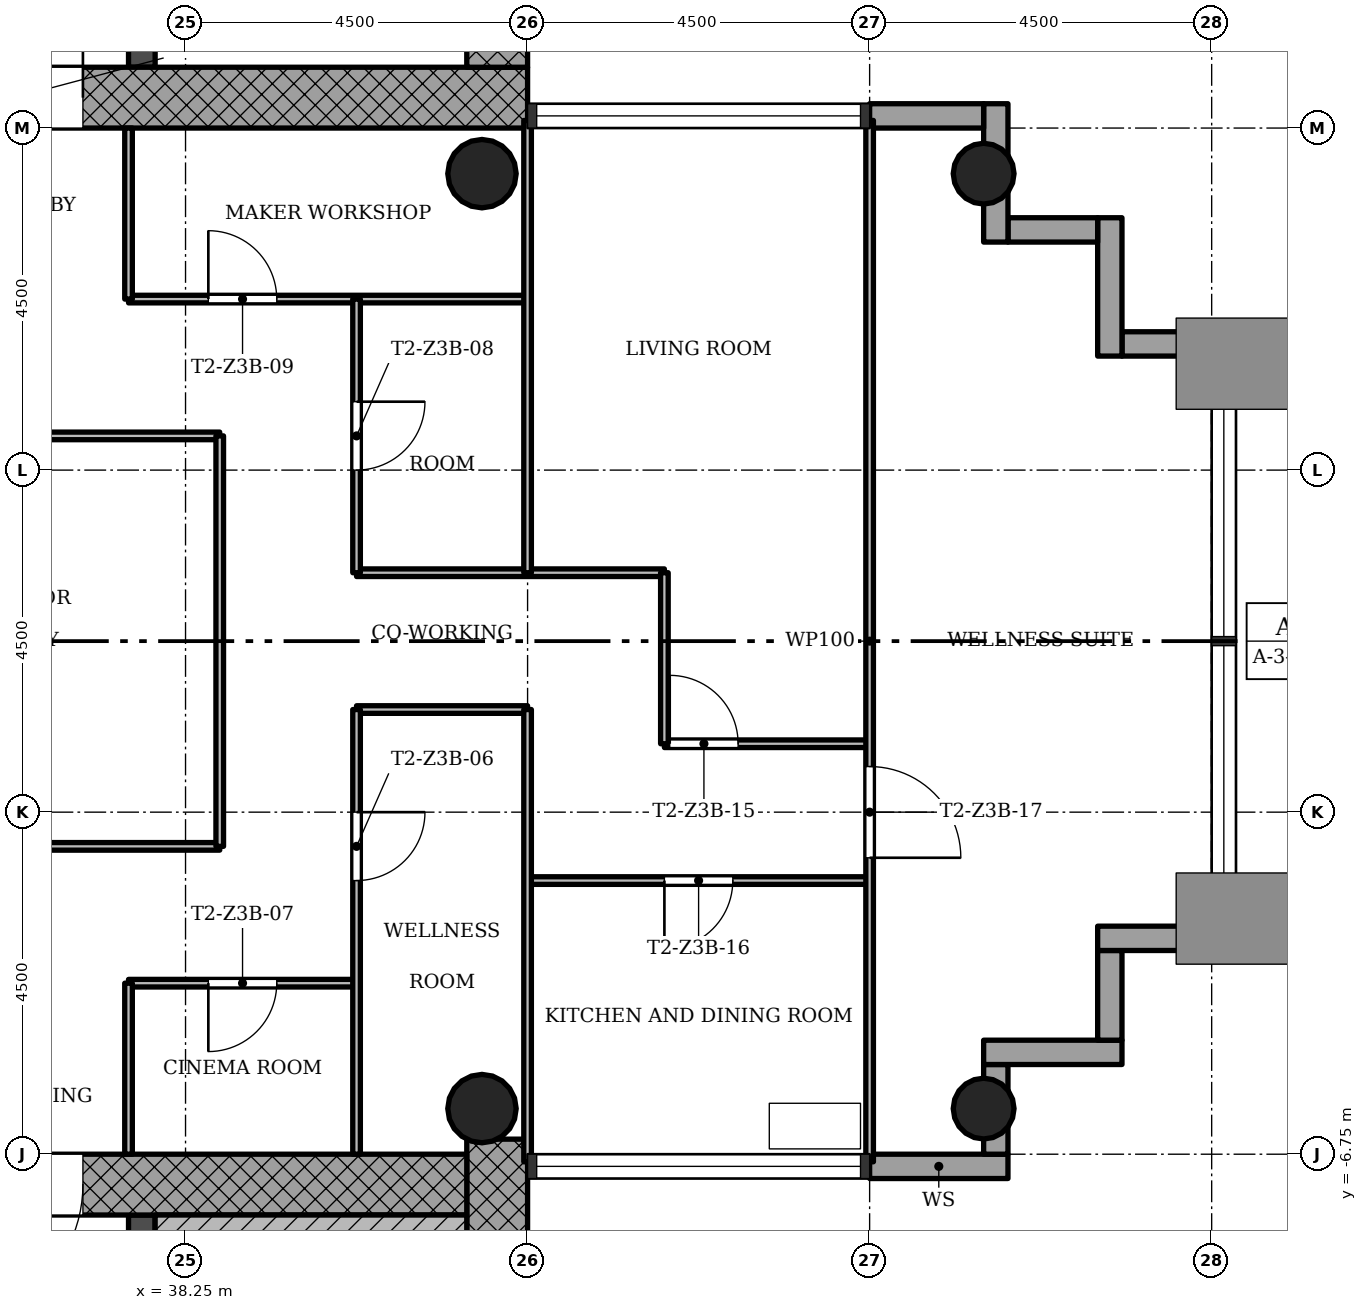
"""IFC4 building model, lengths in metres.
Left out: names, types, materials, properties, quantities, classifications, styles, units other than length and angle.
Written with IfcOpenShell. Run it as: python <this file> out.ifc"""

import sys

from ifc_helpers import new_model, si_unit, direction, frame, frame_2d, origin, origin_2d, place, context, subcontext, project, spatial, rectangle, hollow_circle, extrude, element, fill, save


model = new_model("IFC4")
c1 = context("Model", 3, precision=1e-05, world=origin(), true_north=direction((0.0, 1.0)))
c2 = subcontext(c1, "Body", "Model", "MODEL_VIEW")
j1 = project(units=[si_unit("LENGTHUNIT", "METRE"), si_unit("PLANEANGLEUNIT", "RADIAN")], contexts=[c1])
p1 = place(None, origin())
s1 = spatial("IfcSite", under=j1, at=p1, CompositionType="ELEMENT")
p2 = place(p1, origin())
s2 = spatial("IfcBuilding", under=s1, at=p2, CompositionType="ELEMENT")
p3 = place(p2, frame((0.0, 0.0, 150.7)))
s3 = spatial("IfcBuildingStorey", under=s2, at=p3, CompositionType="ELEMENT", Elevation=150.7)
p4 = place(p3, frame((30.05, 7.15, 0.0), z_axis=(0.0, 0.0, 1.0), x_axis=(1.0, 0.0, 0.0)))
e1 = element("IfcWall", 1, at=p4, inside=s3, PredefinedType="SHEAR", context=c2, shape_type="SweptSolid", body=[
    extrude(rectangle(XDim=12.7, YDim=0.8, at=frame_2d((6.35, 0.0))), origin(), (0.0, 0.0, 1.0), 3.4),
])
p5 = place(p4, frame((5.05, 0.0, 0.0)))
e2 = element("IfcOpeningElement", 2, at=p5, cuts=e1, PredefinedType="OPENING", context=c2, shape_type="SweptSolid", body=[
    extrude(rectangle(XDim=1.8, YDim=2.1, at=frame_2d((0.9, 1.05))), frame((0.0, 0.41, 0.0), z_axis=(0.0, -1.0, 0.0), x_axis=(1.0, 0.0, 0.0)), (0.0, 0.0, 1.0), 0.82),
])
p6 = place(p3, frame((42.35, 7.55, 0.0), z_axis=(0.0, 0.0, 1.0), x_axis=(0.0, 1.0, 0.0)))
e3 = element("IfcWall", 3, at=p6, inside=s3, PredefinedType="SHEAR", context=c2, shape_type="SweptSolid", body=[
    extrude(rectangle(XDim=8.2, YDim=0.8, at=frame_2d((4.1, 0.0))), origin(), (0.0, 0.0, 1.0), 3.4),
])
p7 = place(p3, frame((37.675, 7.55, 0.0), z_axis=(0.0, 0.0, 1.0), x_axis=(0.0, 1.0, 0.0)))
e4 = element("IfcWall", 4, at=p7, inside=s3, PredefinedType="SHEAR", context=c2, shape_type="SweptSolid", body=[
    extrude(rectangle(XDim=7.4, YDim=0.35, at=frame_2d((3.7, 0.0))), origin(), (0.0, 0.0, 1.0), 3.4),
])
p8 = place(p7, frame((0.95, 0.0, 0.0)))
e5 = element("IfcOpeningElement", 5, at=p8, cuts=e4, PredefinedType="OPENING", context=c2, shape_type="SweptSolid", body=[
    extrude(rectangle(XDim=1.1, YDim=2.1, at=frame_2d((0.55, 1.05))), frame((0.0, 0.185, 0.0), z_axis=(0.0, -1.0, 0.0), x_axis=(1.0, 0.0, 0.0)), (0.0, 0.0, 1.0), 0.37),
])
p9 = place(p7, frame((3.15, 0.0, 0.0)))
e6 = element("IfcOpeningElement", 6, at=p9, cuts=e4, PredefinedType="OPENING", context=c2, shape_type="SweptSolid", body=[
    extrude(rectangle(XDim=1.1, YDim=2.1, at=frame_2d((0.55, 1.05))), frame((0.0, 0.185, 0.0), z_axis=(0.0, -1.0, 0.0), x_axis=(1.0, 0.0, 0.0)), (0.0, 0.0, 1.0), 0.37),
])
p10 = place(p7, frame((5.35, 0.0, 0.0)))
e7 = element("IfcOpeningElement", 7, at=p10, cuts=e4, PredefinedType="OPENING", context=c2, shape_type="SweptSolid", body=[
    extrude(rectangle(XDim=1.1, YDim=2.1, at=frame_2d((0.55, 1.05))), frame((0.0, 0.185, 0.0), z_axis=(0.0, -1.0, 0.0), x_axis=(1.0, 0.0, 0.0)), (0.0, 0.0, 1.0), 0.37),
])
p11 = place(p3, frame((42.35, -14.95, 0.0), z_axis=(0.0, 0.0, 1.0), x_axis=(0.0, 1.0, 0.0)))
e8 = element("IfcWall", 8, at=p11, inside=s3, PredefinedType="SHEAR", context=c2, shape_type="SweptSolid", body=[
    extrude(rectangle(XDim=8.398, YDim=0.8, at=frame_2d((4.199, 0.0))), origin(), (0.0, 0.0, 1.0), 3.4),
])
p12 = place(p3, frame((41.95, -7.15, 0.0), z_axis=(0.0, 0.0, 1.0), x_axis=(-1.0, 0.0, 0.0)))
e9 = element("IfcWall", 9, at=p12, inside=s3, PredefinedType="SHEAR", context=c2, shape_type="SweptSolid", body=[
    extrude(rectangle(XDim=12.7, YDim=0.8, at=frame_2d((6.35, 0.0))), origin(), (0.0, 0.0, 1.0), 3.4),
])
p13 = place(p12, frame((5.05, 0.0, 0.0)))
e10 = element("IfcOpeningElement", 10, at=p13, cuts=e9, PredefinedType="OPENING", context=c2, shape_type="SweptSolid", body=[
    extrude(rectangle(XDim=1.8, YDim=2.1, at=frame_2d((0.9, 1.05))), frame((0.0, 0.41, 0.0), z_axis=(0.0, -1.0, 0.0), x_axis=(1.0, 0.0, 0.0)), (0.0, 0.0, 1.0), 0.82),
])
p14 = place(p3, frame((37.675, -14.95, 0.0), z_axis=(0.0, 0.0, 1.0), x_axis=(0.0, 1.0, 0.0)))
e11 = element("IfcWall", 11, at=p14, inside=s3, PredefinedType="SHEAR", context=c2, shape_type="SweptSolid", body=[
    extrude(rectangle(XDim=7.4, YDim=0.35, at=frame_2d((3.7, 0.0))), origin(), (0.0, 0.0, 1.0), 3.4),
])
p15 = place(p14, frame((5.65, 0.0, 0.0)))
e12 = element("IfcOpeningElement", 12, at=p15, cuts=e11, PredefinedType="OPENING", context=c2, shape_type="SweptSolid", body=[
    extrude(rectangle(XDim=0.9, YDim=2.1, at=frame_2d((0.45, 1.05))), frame((0.0, 0.185, 0.0), z_axis=(0.0, -1.0, 0.0), x_axis=(1.0, 0.0, 0.0)), (0.0, 0.0, 1.0), 0.37),
])
for number, where, z_axis, x_axis in (
    (13, (48.75, -6.15, 0.0), (0.0, 0.0, 1.0), (1.0, 0.0, 0.0)),
    (14, (48.75, 6.15, 0.0), (0.0, 0.0, 1.0), (1.0, 0.0, 0.0)),
):
    element("IfcColumn", number, at=place(p3, frame(where, z_axis=z_axis, x_axis=x_axis)), inside=s3, PredefinedType="COLUMN", context=c2, shape_type="SweptSolid", body=[
        extrude(hollow_circle(Radius=0.4, WallThickness=0.028, at=origin_2d()), origin(), (0.0, 0.0, 1.0), 3.4),
    ])
for number, where, z_axis, x_axis in (
    (15, (42.15, -6.15, 0.0), (0.0, 0.0, 1.0), (1.0, 0.0, 0.0)),
    (16, (42.15, 6.15, 0.0), (0.0, 0.0, 1.0), (1.0, 0.0, 0.0)),
):
    element("IfcColumn", number, at=place(p3, frame(where, z_axis=z_axis, x_axis=x_axis)), inside=s3, PredefinedType="COLUMN", context=c2, shape_type="SweptSolid", body=[
        extrude(hollow_circle(Radius=0.45, WallThickness=0.032, at=origin_2d()), origin(), (0.0, 0.0, 1.0), 3.4),
    ])
p16 = place(p3, frame((47.25, -6.91, -0.3), z_axis=(0.0, 0.0, 1.0), x_axis=(1.0, 0.0, 0.0)))
e17 = element("IfcWall", 17, at=p16, inside=s3, PredefinedType="STANDARD", context=c2, shape_type="SweptSolid", body=[
    extrude(rectangle(XDim=1.82, YDim=0.32, at=frame_2d((0.91, 0.0))), origin(), (0.0, 0.0, 1.0), 3.4),
])
p17 = place(p3, frame((48.91, -6.75, -0.3), z_axis=(0.0, 0.0, 1.0), x_axis=(0.0, 1.0, 0.0)))
e18 = element("IfcWall", 18, at=p17, inside=s3, PredefinedType="STANDARD", context=c2, shape_type="SweptSolid", body=[
    extrude(rectangle(XDim=1.18, YDim=0.32, at=frame_2d((0.59, 0.0))), origin(), (0.0, 0.0, 1.0), 3.4),
])
p18 = place(p3, frame((48.75, -5.41, -0.3), z_axis=(0.0, 0.0, 1.0), x_axis=(1.0, 0.0, 0.0)))
e19 = element("IfcWall", 19, at=p18, inside=s3, PredefinedType="STANDARD", context=c2, shape_type="SweptSolid", body=[
    extrude(rectangle(XDim=1.82, YDim=0.32, at=frame_2d((0.91, 0.0))), origin(), (0.0, 0.0, 1.0), 3.4),
])
p19 = place(p3, frame((50.41, -5.25, -0.3), z_axis=(0.0, 0.0, 1.0), x_axis=(0.0, 1.0, 0.0)))
e20 = element("IfcWall", 20, at=p19, inside=s3, PredefinedType="STANDARD", context=c2, shape_type="SweptSolid", body=[
    extrude(rectangle(XDim=1.18, YDim=0.32, at=frame_2d((0.59, 0.0))), origin(), (0.0, 0.0, 1.0), 3.4),
])
p20 = place(p3, frame((50.25, -3.91, -0.3), z_axis=(0.0, 0.0, 1.0), x_axis=(1.0, 0.0, 0.0)))
e21 = element("IfcWall", 21, at=p20, inside=s3, PredefinedType="STANDARD", context=c2, shape_type="SweptSolid", body=[
    extrude(rectangle(XDim=1.82, YDim=0.32, at=frame_2d((0.91, 0.0))), origin(), (0.0, 0.0, 1.0), 3.4),
])
p21 = place(p3, frame((52.07, 3.91, -0.3), z_axis=(0.0, 0.0, 1.0), x_axis=(-1.0, 0.0, 0.0)))
e22 = element("IfcWall", 22, at=p21, inside=s3, PredefinedType="STANDARD", context=c2, shape_type="SweptSolid", body=[
    extrude(rectangle(XDim=1.5, YDim=0.32, at=frame_2d((0.75, 0.0))), origin(), (0.0, 0.0, 1.0), 3.4),
])
p22 = place(p3, frame((50.41, 3.75, -0.3), z_axis=(0.0, 0.0, 1.0), x_axis=(0.0, 1.0, 0.0)))
e23 = element("IfcWall", 23, at=p22, inside=s3, PredefinedType="STANDARD", context=c2, shape_type="SweptSolid", body=[
    extrude(rectangle(XDim=1.82, YDim=0.32, at=frame_2d((0.91, 0.0))), origin(), (0.0, 0.0, 1.0), 3.4),
])
p23 = place(p3, frame((50.25, 5.41, -0.3), z_axis=(0.0, 0.0, 1.0), x_axis=(-1.0, 0.0, 0.0)))
e24 = element("IfcWall", 24, at=p23, inside=s3, PredefinedType="STANDARD", context=c2, shape_type="SweptSolid", body=[
    extrude(rectangle(XDim=1.18, YDim=0.32, at=frame_2d((0.59, 0.0))), origin(), (0.0, 0.0, 1.0), 3.4),
])
p24 = place(p3, frame((48.91, 5.25, -0.3), z_axis=(0.0, 0.0, 1.0), x_axis=(0.0, 1.0, 0.0)))
e25 = element("IfcWall", 25, at=p24, inside=s3, PredefinedType="STANDARD", context=c2, shape_type="SweptSolid", body=[
    extrude(rectangle(XDim=1.82, YDim=0.32, at=frame_2d((0.91, 0.0))), origin(), (0.0, 0.0, 1.0), 3.4),
])
p25 = place(p3, frame((48.75, 6.91, -0.3), z_axis=(0.0, 0.0, 1.0), x_axis=(-1.0, 0.0, 0.0)))
e26 = element("IfcWall", 26, at=p25, inside=s3, PredefinedType="STANDARD", context=c2, shape_type="SweptSolid", body=[
    extrude(rectangle(XDim=1.5, YDim=0.32, at=frame_2d((0.75, 0.0))), origin(), (0.0, 0.0, 1.0), 3.4),
])
p26 = place(p3, frame((40.5, -4.5, 0.0), z_axis=(0.0, 0.0, 1.0), x_axis=(-1.0, 0.0, 0.0)))
e27 = element("IfcWall", 27, at=p26, inside=s3, PredefinedType="PARTITIONING", context=c2, shape_type="SweptSolid", body=[
    extrude(rectangle(XDim=3.0, YDim=0.1, at=frame_2d((1.5, 0.0))), origin(), (0.0, 0.0, 1.0), 3.0),
])
p27 = place(p26, frame((1.05, 0.0, 0.0)))
e28 = element("IfcOpeningElement", 28, at=p27, cuts=e27, PredefinedType="OPENING", context=c2, shape_type="SweptSolid", body=[
    extrude(rectangle(XDim=0.9, YDim=2.1, at=frame_2d((0.45, 1.05))), frame((0.0, 0.06, 0.0), z_axis=(0.0, -1.0, 0.0), x_axis=(1.0, 0.0, 0.0)), (0.0, 0.0, 1.0), 0.12),
])
p28 = place(p3, frame((47.25, -3.15, 0.0), z_axis=(0.0, 0.0, 1.0), x_axis=(-1.0, 0.0, 0.0)))
e29 = element("IfcWall", 29, at=p28, inside=s3, PredefinedType="PARTITIONING", context=c2, shape_type="SweptSolid", body=[
    extrude(rectangle(XDim=4.5, YDim=0.1, at=frame_2d((2.25, 0.0))), origin(), (0.0, 0.0, 1.0), 3.0),
])
p29 = place(p28, frame((1.8, 0.0, 0.0)))
e30 = element("IfcOpeningElement", 30, at=p29, cuts=e29, PredefinedType="OPENING", context=c2, shape_type="SweptSolid", body=[
    extrude(rectangle(XDim=0.9, YDim=2.1, at=frame_2d((0.45, 1.05))), frame((0.0, 0.06, 0.0), z_axis=(0.0, -1.0, 0.0), x_axis=(1.0, 0.0, 0.0)), (0.0, 0.0, 1.0), 0.12),
])
p30 = place(p3, frame((38.7, -2.7, 0.0), z_axis=(0.0, 0.0, 1.0), x_axis=(-1.0, 0.0, 0.0)))
e31 = element("IfcWall", 31, at=p30, inside=s3, PredefinedType="PARTITIONING", context=c2, shape_type="SweptSolid", body=[
    extrude(rectangle(XDim=5.4, YDim=0.1, at=frame_2d((2.7, 0.0))), origin(), (0.0, 0.0, 1.0), 3.0),
])
p31 = place(p3, frame((47.25, -1.35, 0.0), z_axis=(0.0, 0.0, 1.0), x_axis=(-1.0, 0.0, 0.0)))
e32 = element("IfcWall", 32, at=p31, inside=s3, PredefinedType="PARTITIONING", context=c2, shape_type="SweptSolid", body=[
    extrude(rectangle(XDim=2.7, YDim=0.1, at=frame_2d((1.35, 0.0))), origin(), (0.0, 0.0, 1.0), 3.0),
])
p32 = place(p31, frame((1.73, 0.0, 0.0)))
e33 = element("IfcOpeningElement", 33, at=p32, cuts=e32, PredefinedType="OPENING", context=c2, shape_type="SweptSolid", body=[
    extrude(rectangle(XDim=0.9, YDim=2.1, at=frame_2d((0.45, 1.05))), frame((0.0, 0.06, 0.0), z_axis=(0.0, -1.0, 0.0), x_axis=(1.0, 0.0, 0.0)), (0.0, 0.0, 1.0), 0.12),
])
p33 = place(p3, frame((42.75, -0.9, 0.0), z_axis=(0.0, 0.0, 1.0), x_axis=(-1.0, 0.0, 0.0)))
e34 = element("IfcWall", 34, at=p33, inside=s3, PredefinedType="PARTITIONING", context=c2, shape_type="SweptSolid", body=[
    extrude(rectangle(XDim=2.25, YDim=0.1, at=frame_2d((1.125, 0.0))), origin(), (0.0, 0.0, 1.0), 3.0),
])
p34 = place(p3, frame((44.55, 0.9, 0.0), z_axis=(0.0, 0.0, 1.0), x_axis=(-1.0, 0.0, 0.0)))
e35 = element("IfcWall", 35, at=p34, inside=s3, PredefinedType="PARTITIONING", context=c2, shape_type="SweptSolid", body=[
    extrude(rectangle(XDim=4.05, YDim=0.1, at=frame_2d((2.025, 0.0))), origin(), (0.0, 0.0, 1.0), 3.0),
])
p35 = place(p3, frame((38.7, 2.7, 0.0), z_axis=(0.0, 0.0, 1.0), x_axis=(-1.0, 0.0, 0.0)))
e36 = element("IfcWall", 36, at=p35, inside=s3, PredefinedType="PARTITIONING", context=c2, shape_type="SweptSolid", body=[
    extrude(rectangle(XDim=5.4, YDim=0.1, at=frame_2d((2.7, 0.0))), origin(), (0.0, 0.0, 1.0), 3.0),
])
p36 = place(p3, frame((42.75, 4.5, 0.0), z_axis=(0.0, 0.0, 1.0), x_axis=(-1.0, 0.0, 0.0)))
e37 = element("IfcWall", 37, at=p36, inside=s3, PredefinedType="PARTITIONING", context=c2, shape_type="SweptSolid", body=[
    extrude(rectangle(XDim=5.25, YDim=0.1, at=frame_2d((2.625, 0.0))), origin(), (0.0, 0.0, 1.0), 3.0),
])
p37 = place(p36, frame((3.3, 0.0, 0.0)))
e38 = element("IfcOpeningElement", 38, at=p37, cuts=e37, PredefinedType="OPENING", context=c2, shape_type="SweptSolid", body=[
    extrude(rectangle(XDim=0.9, YDim=2.1, at=frame_2d((0.45, 1.05))), frame((0.0, 0.06, 0.0), z_axis=(0.0, -1.0, 0.0), x_axis=(1.0, 0.0, 0.0)), (0.0, 0.0, 1.0), 0.12),
])
p38 = place(p3, frame((47.25, -6.85, 0.0), z_axis=(0.0, 0.0, 1.0), x_axis=(0.0, 1.0, 0.0)))
e39 = element("IfcWall", 39, at=p38, inside=s3, PredefinedType="PARTITIONING", context=c2, shape_type="SweptSolid", body=[
    extrude(rectangle(XDim=13.7, YDim=0.1, at=frame_2d((6.85, 0.0))), origin(), (0.0, 0.0, 1.0), 3.0),
])
p39 = place(p38, frame((4.0, 0.0, 0.0)))
e40 = element("IfcOpeningElement", 40, at=p39, cuts=e39, PredefinedType="OPENING", context=c2, shape_type="SweptSolid", body=[
    extrude(rectangle(XDim=1.2, YDim=2.1, at=frame_2d((0.6, 1.05))), frame((0.0, 0.06, 0.0), z_axis=(0.0, -1.0, 0.0), x_axis=(1.0, 0.0, 0.0)), (0.0, 0.0, 1.0), 0.12),
])
p40 = place(p3, frame((44.55, -1.35, 0.0), z_axis=(0.0, 0.0, 1.0), x_axis=(0.0, 1.0, 0.0)))
e41 = element("IfcWall", 41, at=p40, inside=s3, PredefinedType="PARTITIONING", context=c2, shape_type="SweptSolid", body=[
    extrude(rectangle(XDim=2.25, YDim=0.1, at=frame_2d((1.125, 0.0))), origin(), (0.0, 0.0, 1.0), 3.0),
])
for number, where, z_axis, x_axis in (
    (42, (42.75, -6.85, 0.0), (0.0, 0.0, 1.0), (0.0, 1.0, 0.0)),
    (43, (42.75, 0.9, 0.0), (0.0, 0.0, 1.0), (0.0, 1.0, 0.0)),
):
    element("IfcWall", number, at=place(p3, frame(where, z_axis=z_axis, x_axis=x_axis)), inside=s3, PredefinedType="PARTITIONING", context=c2, shape_type="SweptSolid", body=[
        extrude(rectangle(XDim=5.95, YDim=0.1, at=frame_2d((2.975, 0.0))), origin(), (0.0, 0.0, 1.0), 3.0),
    ])
p41 = place(p3, frame((40.5, -6.75, 0.0), z_axis=(0.0, 0.0, 1.0), x_axis=(0.0, 1.0, 0.0)))
e44 = element("IfcWall", 44, at=p41, inside=s3, PredefinedType="PARTITIONING", context=c2, shape_type="SweptSolid", body=[
    extrude(rectangle(XDim=5.85, YDim=0.1, at=frame_2d((2.925, 0.0))), origin(), (0.0, 0.0, 1.0), 3.0),
])
p42 = place(p41, frame((3.6, 0.0, 0.0)))
e45 = element("IfcOpeningElement", 45, at=p42, cuts=e44, PredefinedType="OPENING", context=c2, shape_type="SweptSolid", body=[
    extrude(rectangle(XDim=0.9, YDim=2.1, at=frame_2d((0.45, 1.05))), frame((0.0, 0.06, 0.0), z_axis=(0.0, -1.0, 0.0), x_axis=(1.0, 0.0, 0.0)), (0.0, 0.0, 1.0), 0.12),
])
p43 = place(p3, frame((40.5, 0.9, 0.0), z_axis=(0.0, 0.0, 1.0), x_axis=(0.0, 1.0, 0.0)))
e46 = element("IfcWall", 46, at=p43, inside=s3, PredefinedType="PARTITIONING", context=c2, shape_type="SweptSolid", body=[
    extrude(rectangle(XDim=3.6, YDim=0.1, at=frame_2d((1.8, 0.0))), origin(), (0.0, 0.0, 1.0), 3.0),
])
p44 = place(p43, frame((1.35, 0.0, 0.0)))
e47 = element("IfcOpeningElement", 47, at=p44, cuts=e46, PredefinedType="OPENING", context=c2, shape_type="SweptSolid", body=[
    extrude(rectangle(XDim=0.9, YDim=2.1, at=frame_2d((0.45, 1.05))), frame((0.0, 0.06, 0.0), z_axis=(0.0, -1.0, 0.0), x_axis=(1.0, 0.0, 0.0)), (0.0, 0.0, 1.0), 0.12),
])
p45 = place(p3, frame((38.7, -2.7, 0.0), z_axis=(0.0, 0.0, 1.0), x_axis=(0.0, 1.0, 0.0)))
e48 = element("IfcWall", 48, at=p45, inside=s3, PredefinedType="PARTITIONING", context=c2, shape_type="SweptSolid", body=[
    extrude(rectangle(XDim=5.4, YDim=0.1, at=frame_2d((2.7, 0.0))), origin(), (0.0, 0.0, 1.0), 3.0),
])
for number, where, z_axis, x_axis in (
    (49, (37.5, -6.75, 0.0), (0.0, 0.0, 1.0), (0.0, 1.0, 0.0)),
    (50, (37.5, 4.5, 0.0), (0.0, 0.0, 1.0), (0.0, 1.0, 0.0)),
):
    element("IfcWall", number, at=place(p3, frame(where, z_axis=z_axis, x_axis=x_axis)), inside=s3, PredefinedType="PARTITIONING", context=c2, shape_type="SweptSolid", body=[
        extrude(rectangle(XDim=2.25, YDim=0.1, at=frame_2d((1.125, 0.0))), origin(), (0.0, 0.0, 1.0), 3.0),
    ])
p46 = place(p3, frame((37.85, -7.75, 0.0), z_axis=(0.0, 0.0, 1.0), x_axis=(1.0, 0.0, 0.0)))
e51 = element("IfcWall", 51, at=p46, inside=s3, PredefinedType="SHEAR", context=c2, shape_type="SweptSolid", body=[
    extrude(rectangle(XDim=4.1, YDim=0.4, at=frame_2d((2.05, 0.0))), origin(), (0.0, 0.0, 1.0), 3.4),
])
p47 = place(p42, origin())
e52 = element("IfcDoor", 52, at=p47, inside=s3, OperationType="SINGLE_SWING_RIGHT", PredefinedType="DOOR", context=c2, shape_type="SweptSolid", body=[
    extrude(rectangle(XDim=0.9, YDim=2.1, at=frame_2d((0.45, 1.05))), frame((0.0, 0.025, 0.0), z_axis=(0.0, -1.0, 0.0), x_axis=(1.0, 0.0, 0.0)), (0.0, 0.0, 1.0), 0.05),
])
fill(e45, e52)
p48 = place(p27, origin())
e53 = element("IfcDoor", 53, at=p48, inside=s3, OperationType="SINGLE_SWING_LEFT", PredefinedType="DOOR", context=c2, shape_type="SweptSolid", body=[
    extrude(rectangle(XDim=0.9, YDim=2.1, at=frame_2d((0.45, 1.05))), frame((0.0, 0.025, 0.0), z_axis=(0.0, -1.0, 0.0), x_axis=(1.0, 0.0, 0.0)), (0.0, 0.0, 1.0), 0.05),
])
fill(e28, e53)
p49 = place(p44, origin())
e54 = element("IfcDoor", 54, at=p49, inside=s3, OperationType="SINGLE_SWING_RIGHT", PredefinedType="DOOR", context=c2, shape_type="SweptSolid", body=[
    extrude(rectangle(XDim=0.9, YDim=2.1, at=frame_2d((0.45, 1.05))), frame((0.0, 0.025, 0.0), z_axis=(0.0, -1.0, 0.0), x_axis=(1.0, 0.0, 0.0)), (0.0, 0.0, 1.0), 0.05),
])
fill(e47, e54)
p50 = place(p37, origin())
e55 = element("IfcDoor", 55, at=p50, inside=s3, OperationType="SINGLE_SWING_RIGHT", PredefinedType="DOOR", context=c2, shape_type="SweptSolid", body=[
    extrude(rectangle(XDim=0.9, YDim=2.1, at=frame_2d((0.45, 1.05))), frame((0.0, 0.025, 0.0), z_axis=(0.0, -1.0, 0.0), x_axis=(1.0, 0.0, 0.0)), (0.0, 0.0, 1.0), 0.05),
])
fill(e38, e55)
p51 = place(p32, origin())
e56 = element("IfcDoor", 56, at=p51, inside=s3, OperationType="SINGLE_SWING_RIGHT", PredefinedType="DOOR", context=c2, shape_type="SweptSolid", body=[
    extrude(rectangle(XDim=0.9, YDim=2.1, at=frame_2d((0.45, 1.05))), frame((0.0, 0.025, 0.0), z_axis=(0.0, -1.0, 0.0), x_axis=(1.0, 0.0, 0.0)), (0.0, 0.0, 1.0), 0.05),
])
fill(e33, e56)
p52 = place(p29, origin())
e57 = element("IfcDoor", 57, at=p52, inside=s3, OperationType="SINGLE_SWING_LEFT", PredefinedType="DOOR", context=c2, shape_type="SweptSolid", body=[
    extrude(rectangle(XDim=0.9, YDim=2.1, at=frame_2d((0.45, 1.05))), frame((0.0, 0.025, 0.0), z_axis=(0.0, -1.0, 0.0), x_axis=(1.0, 0.0, 0.0)), (0.0, 0.0, 1.0), 0.05),
])
fill(e30, e57)
p53 = place(p39, origin())
e58 = element("IfcDoor", 58, at=p53, inside=s3, OperationType="SINGLE_SWING_LEFT", PredefinedType="DOOR", context=c2, shape_type="SweptSolid", body=[
    extrude(rectangle(XDim=1.2, YDim=2.1, at=frame_2d((0.6, 1.05))), frame((0.0, 0.025, 0.0), z_axis=(0.0, -1.0, 0.0), x_axis=(1.0, 0.0, 0.0)), (0.0, 0.0, 1.0), 0.05),
])
fill(e40, e58)
p54 = place(p5, origin())
e59 = element("IfcDoor", 59, at=p54, inside=s3, OperationType="SINGLE_SWING_LEFT", PredefinedType="DOOR", context=c2, shape_type="SweptSolid", body=[
    extrude(rectangle(XDim=1.8, YDim=2.1, at=frame_2d((0.9, 1.05))), frame((0.0, 0.025, 0.0), z_axis=(0.0, -1.0, 0.0), x_axis=(1.0, 0.0, 0.0)), (0.0, 0.0, 1.0), 0.05),
])
fill(e2, e59)
p55 = place(p13, origin())
e60 = element("IfcDoor", 60, at=p55, inside=s3, OperationType="SINGLE_SWING_LEFT", PredefinedType="DOOR", context=c2, shape_type="SweptSolid", body=[
    extrude(rectangle(XDim=1.8, YDim=2.1, at=frame_2d((0.9, 1.05))), frame((0.0, 0.025, 0.0), z_axis=(0.0, -1.0, 0.0), x_axis=(1.0, 0.0, 0.0)), (0.0, 0.0, 1.0), 0.05),
])
fill(e10, e60)
save(model, sys.argv[1])
